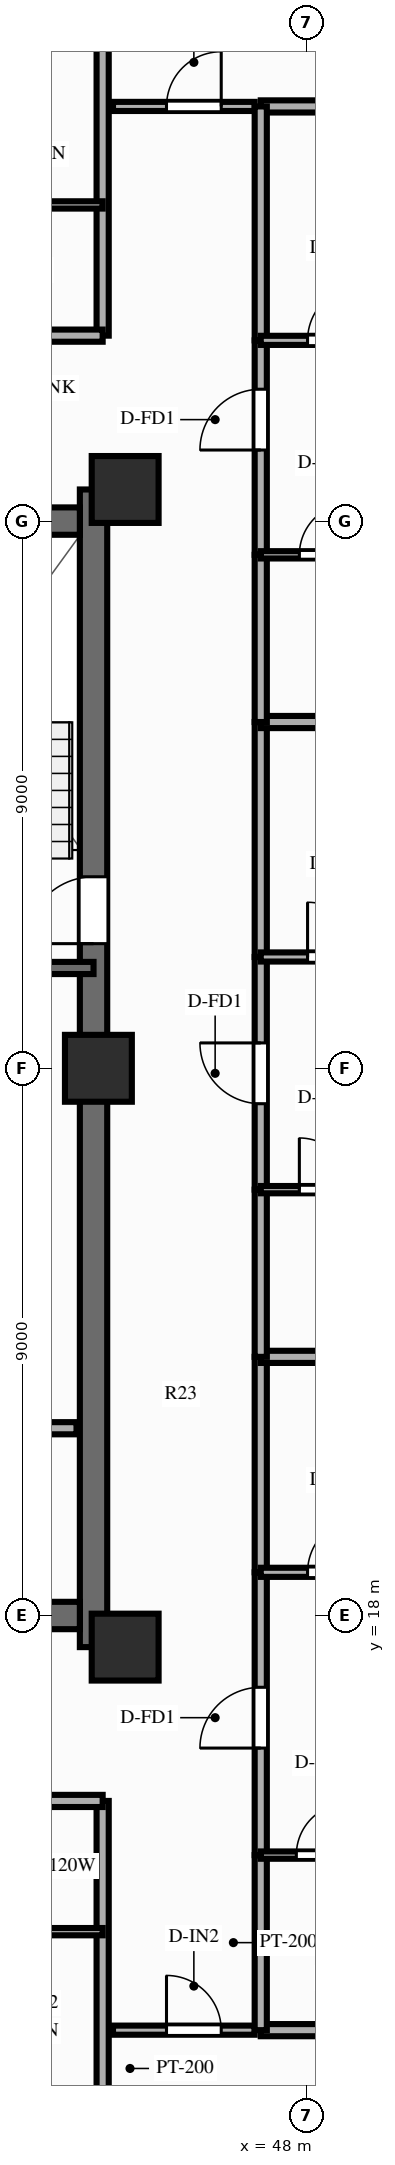
"""IFC4 building model, lengths in metres.
Left out: names, types, materials, properties, quantities, classifications, styles, units other than length and angle.
Written with IfcOpenShell. Run it as: python <this file> out.ifc"""

import sys

from ifc_helpers import new_model, si_unit, direction, frame, frame_2d, origin, origin_2d, place, context, subcontext, project, spatial, rectangle, extrude, source, transform, mapped, element, fill, save


model = new_model("IFC4")
c1 = context("Model", 3, precision=1e-05, world=origin(), true_north=direction((0.0, 1.0)))
c2 = subcontext(c1, "Body", "Model", "MODEL_VIEW")
j1 = project(units=[si_unit("LENGTHUNIT", "METRE"), si_unit("PLANEANGLEUNIT", "RADIAN")], contexts=[c1])
p1 = place(None, origin())
s1 = spatial("IfcSite", under=j1, at=p1, CompositionType="ELEMENT")
p2 = place(p1, origin())
s2 = spatial("IfcBuilding", under=s1, at=p2, CompositionType="ELEMENT")
p3 = place(p2, frame((0.0, 0.0, 176.8)))
s3 = spatial("IfcBuildingStorey", under=s2, at=p3, CompositionType="ELEMENT", Elevation=176.8)
p4 = place(p3, frame((44.5, 17.48, 0.0), z_axis=(0.0, 0.0, 1.0), x_axis=(0.0, 1.0, 0.0)))
e1 = element("IfcWall", 1, at=p4, inside=s3, PredefinedType="SHEAR", context=c2, shape_type="SweptSolid", body=[
    extrude(rectangle(XDim=19.04, YDim=0.45, at=frame_2d((9.52, 0.0))), origin(), (0.0, 0.0, 1.0), 3.0),
])
p5 = place(p4, frame((12.67, 0.0, 0.0), z_axis=(0.0, 0.0, 1.0), x_axis=(-1.0, 0.0, 0.0)))
e2 = element("IfcOpeningElement", 2, at=p5, cuts=e1, PredefinedType="OPENING", context=c2, shape_type="SweptSolid", body=[
    extrude(rectangle(XDim=1.1, YDim=2.15, at=frame_2d((0.55, 1.075))), frame((0.0, 0.237, 0.0), z_axis=(0.0, -1.0, 0.0), x_axis=(1.0, 0.0, 0.0)), (0.0, 0.0, 1.0), 0.474),
])
p6 = place(p3, frame((31.725, 18.0, 0.0), z_axis=(0.0, 0.0, 1.0), x_axis=(1.0, 0.0, 0.0)))
e3 = element("IfcWall", 3, at=p6, inside=s3, PredefinedType="SHEAR", context=c2, shape_type="SweptSolid", body=[
    extrude(rectangle(XDim=12.55, YDim=0.45, at=frame_2d((6.275, 0.0))), origin(), (0.0, 0.0, 1.0), 3.0),
])
p7 = place(p3, frame((31.725, 36.0, 0.0), z_axis=(0.0, 0.0, 1.0), x_axis=(1.0, 0.0, 0.0)))
e4 = element("IfcWall", 4, at=p7, inside=s3, PredefinedType="SHEAR", context=c2, shape_type="SweptSolid", body=[
    extrude(rectangle(XDim=12.55, YDim=0.45, at=frame_2d((6.275, 0.0))), origin(), (0.0, 0.0, 1.0), 3.0),
])
p8 = place(p7, frame((5.225, 0.0, 0.0), z_axis=(0.0, 0.0, 1.0), x_axis=(-1.0, 0.0, 0.0)))
e5 = element("IfcOpeningElement", 5, at=p8, cuts=e4, PredefinedType="OPENING", context=c2, shape_type="SweptSolid", body=[
    extrude(rectangle(XDim=1.4, YDim=2.15, at=frame_2d((0.7, 1.075))), frame((0.0, 0.237, 0.0), z_axis=(0.0, -1.0, 0.0), x_axis=(1.0, 0.0, 0.0)), (0.0, 0.0, 1.0), 0.474),
])
m1 = source(origin(), c2, "Body", "SweptSolid", [
    extrude(rectangle(XDim=1.1, YDim=1.1, at=origin_2d()), origin(), (0.0, 0.0, 1.0), 3.0),
])
for number, where, z_axis, x_axis in (
    (6, (45.02, 17.48, 0.0), (0.0, 0.0, 1.0), (1.0, 0.0, 0.0)),
    (7, (45.02, 36.52, 0.0), (0.0, 0.0, 1.0), (1.0, 0.0, 0.0)),
    (8, (44.58, 27.0, 0.0), (0.0, 0.0, 1.0), (1.0, 0.0, 0.0)),
):
    element("IfcColumn", number, at=place(p3, frame(where, z_axis=z_axis, x_axis=x_axis)), inside=s3, PredefinedType="COLUMN", context=c2, shape_type="MappedRepresentation", body=[
        mapped(m1, transform((0.0, 0.0, 0.0), scale=1.0)),
    ])
p9 = place(p3, frame((42.88, 21.08, 0.0), z_axis=(0.0, 0.0, 1.0), x_axis=(1.0, 0.0, 0.0)))
e9 = element("IfcWall", 9, at=p9, inside=s3, PredefinedType="PARTITIONING", context=c2, shape_type="SweptSolid", body=[
    extrude(rectangle(XDim=1.34, YDim=0.2, at=frame_2d((0.67, 0.0))), origin(), (0.0, 0.0, 1.0), 2.79),
])
p10 = place(p3, frame((40.57, 28.65, 0.0), z_axis=(0.0, 0.0, 1.0), x_axis=(1.0, 0.0, 0.0)))
e10 = element("IfcWall", 10, at=p10, inside=s3, PredefinedType="SOLIDWALL", context=c2, shape_type="SweptSolid", body=[
    extrude(rectangle(XDim=3.93, YDim=0.2, at=frame_2d((1.965, 0.0))), origin(), (0.0, 0.0, 1.0), 2.79),
])
p11 = place(p3, frame((44.82, 11.18, 0.0), z_axis=(0.0, 0.0, 1.0), x_axis=(1.0, 0.0, 0.0)))
e11 = element("IfcWall", 11, at=p11, inside=s3, PredefinedType="PARTITIONING", context=c2, shape_type="SweptSolid", body=[
    extrude(rectangle(XDim=2.33, YDim=0.15, at=frame_2d((1.165, 0.0))), origin(), (0.0, 0.0, 1.0), 2.79),
])
p12 = place(p11, frame((0.88, 0.0, 0.0)))
e12 = element("IfcOpeningElement", 12, at=p12, cuts=e11, PredefinedType="OPENING", context=c2, shape_type="SweptSolid", body=[
    extrude(rectangle(XDim=0.9, YDim=2.1, at=frame_2d((0.45, 1.05))), frame((0.0, 0.087, 0.0), z_axis=(0.0, -1.0, 0.0), x_axis=(1.0, 0.0, 0.0)), (0.0, 0.0, 1.0), 0.174),
])
p13 = place(p3, frame((44.82, 42.82, 0.0), z_axis=(0.0, 0.0, 1.0), x_axis=(1.0, 0.0, 0.0)))
e13 = element("IfcWall", 13, at=p13, inside=s3, PredefinedType="PARTITIONING", context=c2, shape_type="SweptSolid", body=[
    extrude(rectangle(XDim=2.33, YDim=0.15, at=frame_2d((1.165, 0.0))), origin(), (0.0, 0.0, 1.0), 2.79),
])
p14 = place(p13, frame((0.88, 0.0, 0.0)))
e14 = element("IfcOpeningElement", 14, at=p14, cuts=e13, PredefinedType="OPENING", context=c2, shape_type="SweptSolid", body=[
    extrude(rectangle(XDim=0.9, YDim=2.1, at=frame_2d((0.45, 1.05))), frame((0.0, 0.087, 0.0), z_axis=(0.0, -1.0, 0.0), x_axis=(1.0, 0.0, 0.0)), (0.0, 0.0, 1.0), 0.174),
])
p15 = place(p3, frame((44.65, 14.95, 0.0), z_axis=(0.0, 0.0, 1.0), x_axis=(0.0, -1.0, 0.0)))
e15 = element("IfcWall", 15, at=p15, inside=s3, PredefinedType="PARTITIONING", context=c2, shape_type="SweptSolid", body=[
    extrude(rectangle(XDim=8.8, YDim=0.2, at=frame_2d((4.4, 0.0))), origin(), (0.0, 0.0, 1.0), 2.39),
])
p16 = place(p3, frame((41.8, 14.95, 0.0), z_axis=(0.0, 0.0, 1.0), x_axis=(1.0, 0.0, 0.0)))
e16 = element("IfcWall", 16, at=p16, inside=s3, PredefinedType="PARTITIONING", context=c2, shape_type="SweptSolid", body=[
    extrude(rectangle(XDim=2.85, YDim=0.2, at=frame_2d((1.425, 0.0))), origin(), (0.0, 0.0, 1.0), 2.79),
])
p17 = place(p3, frame((41.8, 12.8, 0.0), z_axis=(0.0, 0.0, 1.0), x_axis=(1.0, 0.0, 0.0)))
e17 = element("IfcWall", 17, at=p17, inside=s3, PredefinedType="PARTITIONING", context=c2, shape_type="SweptSolid", body=[
    extrude(rectangle(XDim=2.85, YDim=0.12, at=frame_2d((1.425, 0.0))), origin(), (0.0, 0.0, 1.0), 2.79),
])
p18 = place(p3, frame((44.65, 39.05, 0.0), z_axis=(0.0, 0.0, 1.0), x_axis=(0.0, 1.0, 0.0)))
e18 = element("IfcWall", 18, at=p18, inside=s3, PredefinedType="PARTITIONING", context=c2, shape_type="SweptSolid", body=[
    extrude(rectangle(XDim=8.8, YDim=0.2, at=frame_2d((4.4, 0.0))), origin(), (0.0, 0.0, 1.0), 2.39),
])
p19 = place(p3, frame((41.88, 39.05, 0.0), z_axis=(0.0, 0.0, 1.0), x_axis=(1.0, 0.0, 0.0)))
e19 = element("IfcWall", 19, at=p19, inside=s3, PredefinedType="PARTITIONING", context=c2, shape_type="SweptSolid", body=[
    extrude(rectangle(XDim=2.77, YDim=0.2, at=frame_2d((1.385, 0.0))), origin(), (0.0, 0.0, 1.0), 2.79),
])
p20 = place(p3, frame((41.88, 41.2, 0.0), z_axis=(0.0, 0.0, 1.0), x_axis=(1.0, 0.0, 0.0)))
e20 = element("IfcWall", 20, at=p20, inside=s3, PredefinedType="PARTITIONING", context=c2, shape_type="SweptSolid", body=[
    extrude(rectangle(XDim=2.77, YDim=0.12, at=frame_2d((1.385, 0.0))), origin(), (0.0, 0.0, 1.0), 2.79),
])
for number, where, z_axis, x_axis in (
    (21, (47.25, 11.18, 0.0), (0.0, 0.0, 1.0), (1.0, 0.0, 0.0)),
    (22, (47.25, 42.82, 0.0), (0.0, 0.0, 1.0), (1.0, 0.0, 0.0)),
):
    element("IfcWall", number, at=place(p3, frame(where, z_axis=z_axis, x_axis=x_axis)), inside=s3, PredefinedType="PARTITIONING", context=c2, shape_type="SweptSolid", body=[
        extrude(rectangle(XDim=10.85, YDim=0.2, at=frame_2d((5.425, 0.0))), origin(), (0.0, 0.0, 1.0), 2.79),
    ])
p21 = place(p3, frame((47.25, 11.18, 0.0), z_axis=(0.0, 0.0, 1.0), x_axis=(0.0, 1.0, 0.0)))
e23 = element("IfcWall", 23, at=p21, inside=s3, PredefinedType="PARTITIONING", context=c2, shape_type="SweptSolid", body=[
    extrude(rectangle(XDim=2.879, YDim=0.2, at=frame_2d((1.439, 0.0))), origin(), (0.0, 0.0, 1.0), 2.79),
])
p22 = place(p3, frame((47.25, 14.059, 0.0), z_axis=(0.0, 0.0, 1.0), x_axis=(0.0, 1.0, 0.0)))
e24 = element("IfcWall", 24, at=p22, inside=s3, PredefinedType="PARTITIONING", context=c2, shape_type="SweptSolid", body=[
    extrude(rectangle(XDim=4.651, YDim=0.2, at=frame_2d((2.326, 0.0))), origin(), (0.0, 0.0, 1.0), 2.79),
])
p23 = place(p22, frame((1.76, 0.0, 0.0)))
e25 = element("IfcOpeningElement", 25, at=p23, cuts=e24, PredefinedType="OPENING", context=c2, shape_type="SweptSolid", body=[
    extrude(rectangle(XDim=1.0, YDim=2.15, at=frame_2d((0.5, 1.075))), frame((0.0, 0.112, 0.0), z_axis=(0.0, -1.0, 0.0), x_axis=(1.0, 0.0, 0.0)), (0.0, 0.0, 1.0), 0.224),
])
p24 = place(p3, frame((47.25, 18.71, 0.0), z_axis=(0.0, 0.0, 1.0), x_axis=(0.0, 1.0, 0.0)))
e26 = element("IfcWall", 26, at=p24, inside=s3, PredefinedType="PARTITIONING", context=c2, shape_type="SweptSolid", body=[
    extrude(rectangle(XDim=3.544, YDim=0.2, at=frame_2d((1.772, 0.0))), origin(), (0.0, 0.0, 1.0), 2.79),
])
p25 = place(p3, frame((47.25, 14.059, 0.0), z_axis=(0.0, 0.0, 1.0), x_axis=(1.0, 0.0, 0.0)))
e27 = element("IfcWall", 27, at=p25, inside=s3, PredefinedType="PARTITIONING", context=c2, shape_type="SweptSolid", body=[
    extrude(rectangle(XDim=2.02, YDim=0.12, at=frame_2d((1.01, 0.0))), origin(), (0.0, 0.0, 1.0), 2.79),
])
p26 = place(p25, frame((0.585, 0.0, 0.0)))
e28 = element("IfcOpeningElement", 28, at=p26, cuts=e27, PredefinedType="OPENING", context=c2, shape_type="SweptSolid", body=[
    extrude(rectangle(XDim=0.85, YDim=2.05, at=frame_2d((0.425, 1.025))), frame((0.0, 0.072, 0.0), z_axis=(0.0, -1.0, 0.0), x_axis=(1.0, 0.0, 0.0)), (0.0, 0.0, 1.0), 0.144),
])
p27 = place(p3, frame((47.25, 18.71, 0.0), z_axis=(0.0, 0.0, 1.0), x_axis=(1.0, 0.0, 0.0)))
e29 = element("IfcWall", 29, at=p27, inside=s3, PredefinedType="PARTITIONING", context=c2, shape_type="SweptSolid", body=[
    extrude(rectangle(XDim=2.44, YDim=0.15, at=frame_2d((1.22, 0.0))), origin(), (0.0, 0.0, 1.0), 2.79),
])
p28 = place(p27, frame((0.77, 0.0, 0.0)))
e30 = element("IfcOpeningElement", 30, at=p28, cuts=e29, PredefinedType="OPENING", context=c2, shape_type="SweptSolid", body=[
    extrude(rectangle(XDim=0.9, YDim=2.1, at=frame_2d((0.45, 1.05))), frame((0.0, 0.087, 0.0), z_axis=(0.0, -1.0, 0.0), x_axis=(1.0, 0.0, 0.0)), (0.0, 0.0, 1.0), 0.174),
])
p29 = place(p3, frame((47.25, 22.254, 0.0), z_axis=(0.0, 0.0, 1.0), x_axis=(1.0, 0.0, 0.0)))
e31 = element("IfcWall", 31, at=p29, inside=s3, PredefinedType="PARTITIONING", context=c2, shape_type="SweptSolid", body=[
    extrude(rectangle(XDim=10.85, YDim=0.2, at=frame_2d((5.425, 0.0))), origin(), (0.0, 0.0, 1.0), 2.39),
])
p30 = place(p3, frame((47.25, 22.254, 0.0), z_axis=(0.0, 0.0, 1.0), x_axis=(0.0, 1.0, 0.0)))
e32 = element("IfcWall", 32, at=p30, inside=s3, PredefinedType="PARTITIONING", context=c2, shape_type="SweptSolid", body=[
    extrude(rectangle(XDim=2.75, YDim=0.2, at=frame_2d((1.375, 0.0))), origin(), (0.0, 0.0, 1.0), 2.79),
])
p31 = place(p3, frame((47.25, 25.004, 0.0), z_axis=(0.0, 0.0, 1.0), x_axis=(0.0, 1.0, 0.0)))
e33 = element("IfcWall", 33, at=p31, inside=s3, PredefinedType="PARTITIONING", context=c2, shape_type="SweptSolid", body=[
    extrude(rectangle(XDim=3.827, YDim=0.2, at=frame_2d((1.914, 0.0))), origin(), (0.0, 0.0, 1.0), 2.79),
])
p32 = place(p31, frame((1.413, 0.0, 0.0)))
e34 = element("IfcOpeningElement", 34, at=p32, cuts=e33, PredefinedType="OPENING", context=c2, shape_type="SweptSolid", body=[
    extrude(rectangle(XDim=1.0, YDim=2.15, at=frame_2d((0.5, 1.075))), frame((0.0, 0.112, 0.0), z_axis=(0.0, -1.0, 0.0), x_axis=(1.0, 0.0, 0.0)), (0.0, 0.0, 1.0), 0.224),
])
p33 = place(p3, frame((47.25, 28.831, 0.0), z_axis=(0.0, 0.0, 1.0), x_axis=(0.0, 1.0, 0.0)))
e35 = element("IfcWall", 35, at=p33, inside=s3, PredefinedType="PARTITIONING", context=c2, shape_type="SweptSolid", body=[
    extrude(rectangle(XDim=3.865, YDim=0.2, at=frame_2d((1.932, 0.0))), origin(), (0.0, 0.0, 1.0), 2.79),
])
p34 = place(p3, frame((47.25, 25.004, 0.0), z_axis=(0.0, 0.0, 1.0), x_axis=(1.0, 0.0, 0.0)))
e36 = element("IfcWall", 36, at=p34, inside=s3, PredefinedType="PARTITIONING", context=c2, shape_type="SweptSolid", body=[
    extrude(rectangle(XDim=2.12, YDim=0.12, at=frame_2d((1.06, 0.0))), origin(), (0.0, 0.0, 1.0), 2.79),
])
p35 = place(p34, frame((0.635, 0.0, 0.0)))
e37 = element("IfcOpeningElement", 37, at=p35, cuts=e36, PredefinedType="OPENING", context=c2, shape_type="SweptSolid", body=[
    extrude(rectangle(XDim=0.85, YDim=2.05, at=frame_2d((0.425, 1.025))), frame((0.0, 0.072, 0.0), z_axis=(0.0, -1.0, 0.0), x_axis=(1.0, 0.0, 0.0)), (0.0, 0.0, 1.0), 0.144),
])
p36 = place(p3, frame((47.25, 28.831, 0.0), z_axis=(0.0, 0.0, 1.0), x_axis=(1.0, 0.0, 0.0)))
e38 = element("IfcWall", 38, at=p36, inside=s3, PredefinedType="PARTITIONING", context=c2, shape_type="SweptSolid", body=[
    extrude(rectangle(XDim=2.44, YDim=0.15, at=frame_2d((1.22, 0.0))), origin(), (0.0, 0.0, 1.0), 2.79),
])
p37 = place(p36, frame((0.77, 0.0, 0.0)))
e39 = element("IfcOpeningElement", 39, at=p37, cuts=e38, PredefinedType="OPENING", context=c2, shape_type="SweptSolid", body=[
    extrude(rectangle(XDim=0.9, YDim=2.1, at=frame_2d((0.45, 1.05))), frame((0.0, 0.087, 0.0), z_axis=(0.0, -1.0, 0.0), x_axis=(1.0, 0.0, 0.0)), (0.0, 0.0, 1.0), 0.174),
])
p38 = place(p3, frame((47.25, 32.695, 0.0), z_axis=(0.0, 0.0, 1.0), x_axis=(1.0, 0.0, 0.0)))
e40 = element("IfcWall", 40, at=p38, inside=s3, PredefinedType="PARTITIONING", context=c2, shape_type="SweptSolid", body=[
    extrude(rectangle(XDim=10.85, YDim=0.2, at=frame_2d((5.425, 0.0))), origin(), (0.0, 0.0, 1.0), 2.79),
])
p39 = place(p3, frame((47.25, 32.695, 0.0), z_axis=(0.0, 0.0, 1.0), x_axis=(0.0, 1.0, 0.0)))
e41 = element("IfcWall", 41, at=p39, inside=s3, PredefinedType="PARTITIONING", context=c2, shape_type="SweptSolid", body=[
    extrude(rectangle(XDim=2.75, YDim=0.2, at=frame_2d((1.375, 0.0))), origin(), (0.0, 0.0, 1.0), 2.79),
])
p40 = place(p3, frame((47.25, 35.445, 0.0), z_axis=(0.0, 0.0, 1.0), x_axis=(0.0, 1.0, 0.0)))
e42 = element("IfcWall", 42, at=p40, inside=s3, PredefinedType="PARTITIONING", context=c2, shape_type="SweptSolid", body=[
    extrude(rectangle(XDim=3.527, YDim=0.2, at=frame_2d((1.764, 0.0))), origin(), (0.0, 0.0, 1.0), 2.79),
])
p41 = place(p40, frame((1.724, 0.0, 0.0)))
e43 = element("IfcOpeningElement", 43, at=p41, cuts=e42, PredefinedType="OPENING", context=c2, shape_type="SweptSolid", body=[
    extrude(rectangle(XDim=1.0, YDim=2.15, at=frame_2d((0.5, 1.075))), frame((0.0, 0.112, 0.0), z_axis=(0.0, -1.0, 0.0), x_axis=(1.0, 0.0, 0.0)), (0.0, 0.0, 1.0), 0.224),
])
p42 = place(p3, frame((47.25, 38.973, 0.0), z_axis=(0.0, 0.0, 1.0), x_axis=(0.0, 1.0, 0.0)))
e44 = element("IfcWall", 44, at=p42, inside=s3, PredefinedType="PARTITIONING", context=c2, shape_type="SweptSolid", body=[
    extrude(rectangle(XDim=3.847, YDim=0.2, at=frame_2d((1.924, 0.0))), origin(), (0.0, 0.0, 1.0), 2.79),
])
p43 = place(p3, frame((47.25, 35.445, 0.0), z_axis=(0.0, 0.0, 1.0), x_axis=(1.0, 0.0, 0.0)))
e45 = element("IfcWall", 45, at=p43, inside=s3, PredefinedType="PARTITIONING", context=c2, shape_type="SweptSolid", body=[
    extrude(rectangle(XDim=2.12, YDim=0.12, at=frame_2d((1.06, 0.0))), origin(), (0.0, 0.0, 1.0), 2.79),
])
p44 = place(p43, frame((0.635, 0.0, 0.0)))
e46 = element("IfcOpeningElement", 46, at=p44, cuts=e45, PredefinedType="OPENING", context=c2, shape_type="SweptSolid", body=[
    extrude(rectangle(XDim=0.85, YDim=2.05, at=frame_2d((0.425, 1.025))), frame((0.0, 0.072, 0.0), z_axis=(0.0, -1.0, 0.0), x_axis=(1.0, 0.0, 0.0)), (0.0, 0.0, 1.0), 0.144),
])
p45 = place(p3, frame((47.25, 38.973, 0.0), z_axis=(0.0, 0.0, 1.0), x_axis=(1.0, 0.0, 0.0)))
e47 = element("IfcWall", 47, at=p45, inside=s3, PredefinedType="PARTITIONING", context=c2, shape_type="SweptSolid", body=[
    extrude(rectangle(XDim=2.44, YDim=0.15, at=frame_2d((1.22, 0.0))), origin(), (0.0, 0.0, 1.0), 2.79),
])
p46 = place(p45, frame((0.77, 0.0, 0.0)))
e48 = element("IfcOpeningElement", 48, at=p46, cuts=e47, PredefinedType="OPENING", context=c2, shape_type="SweptSolid", body=[
    extrude(rectangle(XDim=0.9, YDim=2.1, at=frame_2d((0.45, 1.05))), frame((0.0, 0.087, 0.0), z_axis=(0.0, -1.0, 0.0), x_axis=(1.0, 0.0, 0.0)), (0.0, 0.0, 1.0), 0.174),
])
m2 = source(origin(), c2, "Body", "SweptSolid", [
    extrude(rectangle(XDim=1.1, YDim=2.15, at=frame_2d((0.55, 1.075))), frame((0.0, 0.025, 0.0), z_axis=(0.0, -1.0, 0.0), x_axis=(1.0, 0.0, 0.0)), (0.0, 0.0, 1.0), 0.05),
])
p47 = place(p5, origin())
e49 = element("IfcDoor", 49, at=p47, inside=s3, OperationType="SINGLE_SWING_RIGHT", PredefinedType="DOOR", context=c2, shape_type="MappedRepresentation", body=[
    mapped(m2, transform((0.0, 0.0, 0.0), scale=1.0)),
])
fill(e2, e49)
m3 = source(origin(), c2, "Body", "SweptSolid", [
    extrude(rectangle(XDim=0.9, YDim=2.1, at=frame_2d((0.45, 1.05))), frame((0.0, 0.025, 0.0), z_axis=(0.0, -1.0, 0.0), x_axis=(1.0, 0.0, 0.0)), (0.0, 0.0, 1.0), 0.05),
])
p48 = place(p12, origin())
e50 = element("IfcDoor", 50, at=p48, inside=s3, OperationType="SINGLE_SWING_LEFT", PredefinedType="DOOR", context=c2, shape_type="MappedRepresentation", body=[
    mapped(m3, transform((0.0, 0.0, 0.0), scale=1.0)),
])
fill(e12, e50)
p49 = place(p14, origin())
e51 = element("IfcDoor", 51, at=p49, inside=s3, OperationType="SINGLE_SWING_RIGHT", PredefinedType="DOOR", context=c2, shape_type="MappedRepresentation", body=[
    mapped(m3, transform((0.0, 0.0, 0.0), scale=1.0)),
])
fill(e14, e51)
m4 = source(origin(), c2, "Body", "SweptSolid", [
    extrude(rectangle(XDim=1.0, YDim=2.15, at=frame_2d((0.5, 1.075))), frame((0.0, 0.025, 0.0), z_axis=(0.0, -1.0, 0.0), x_axis=(1.0, 0.0, 0.0)), (0.0, 0.0, 1.0), 0.05),
])
p50 = place(p23, origin())
e52 = element("IfcDoor", 52, at=p50, inside=s3, OperationType="SINGLE_SWING_LEFT", PredefinedType="DOOR", context=c2, shape_type="MappedRepresentation", body=[
    mapped(m4, transform((0.0, 0.0, 0.0), scale=1.0)),
])
fill(e25, e52)
m5 = source(origin(), c2, "Body", "SweptSolid", [
    extrude(rectangle(XDim=0.85, YDim=2.05, at=frame_2d((0.425, 1.025))), frame((0.0, 0.025, 0.0), z_axis=(0.0, -1.0, 0.0), x_axis=(1.0, 0.0, 0.0)), (0.0, 0.0, 1.0), 0.05),
])
p51 = place(p26, origin())
e53 = element("IfcDoor", 53, at=p51, inside=s3, OperationType="SINGLE_SWING_RIGHT", PredefinedType="DOOR", context=c2, shape_type="MappedRepresentation", body=[
    mapped(m5, transform((0.0, 0.0, 0.0), scale=1.0)),
])
fill(e28, e53)
p52 = place(p28, origin())
e54 = element("IfcDoor", 54, at=p52, inside=s3, OperationType="SINGLE_SWING_RIGHT", PredefinedType="DOOR", context=c2, shape_type="MappedRepresentation", body=[
    mapped(m3, transform((0.0, 0.0, 0.0), scale=1.0)),
])
fill(e30, e54)
p53 = place(p32, origin())
e55 = element("IfcDoor", 55, at=p53, inside=s3, OperationType="SINGLE_SWING_RIGHT", PredefinedType="DOOR", context=c2, shape_type="MappedRepresentation", body=[
    mapped(m4, transform((0.0, 0.0, 0.0), scale=1.0)),
])
fill(e34, e55)
p54 = place(p35, origin())
e56 = element("IfcDoor", 56, at=p54, inside=s3, OperationType="SINGLE_SWING_LEFT", PredefinedType="DOOR", context=c2, shape_type="MappedRepresentation", body=[
    mapped(m5, transform((0.0, 0.0, 0.0), scale=1.0)),
])
fill(e37, e56)
p55 = place(p37, origin())
e57 = element("IfcDoor", 57, at=p55, inside=s3, OperationType="SINGLE_SWING_LEFT", PredefinedType="DOOR", context=c2, shape_type="MappedRepresentation", body=[
    mapped(m3, transform((0.0, 0.0, 0.0), scale=1.0)),
])
fill(e39, e57)
p56 = place(p41, origin())
e58 = element("IfcDoor", 58, at=p56, inside=s3, OperationType="SINGLE_SWING_LEFT", PredefinedType="DOOR", context=c2, shape_type="MappedRepresentation", body=[
    mapped(m4, transform((0.0, 0.0, 0.0), scale=1.0)),
])
fill(e43, e58)
p57 = place(p44, origin())
e59 = element("IfcDoor", 59, at=p57, inside=s3, OperationType="SINGLE_SWING_RIGHT", PredefinedType="DOOR", context=c2, shape_type="MappedRepresentation", body=[
    mapped(m5, transform((0.0, 0.0, 0.0), scale=1.0)),
])
fill(e46, e59)
p58 = place(p46, origin())
e60 = element("IfcDoor", 60, at=p58, inside=s3, OperationType="SINGLE_SWING_RIGHT", PredefinedType="DOOR", context=c2, shape_type="MappedRepresentation", body=[
    mapped(m3, transform((0.0, 0.0, 0.0), scale=1.0)),
])
fill(e48, e60)
save(model, sys.argv[1])
